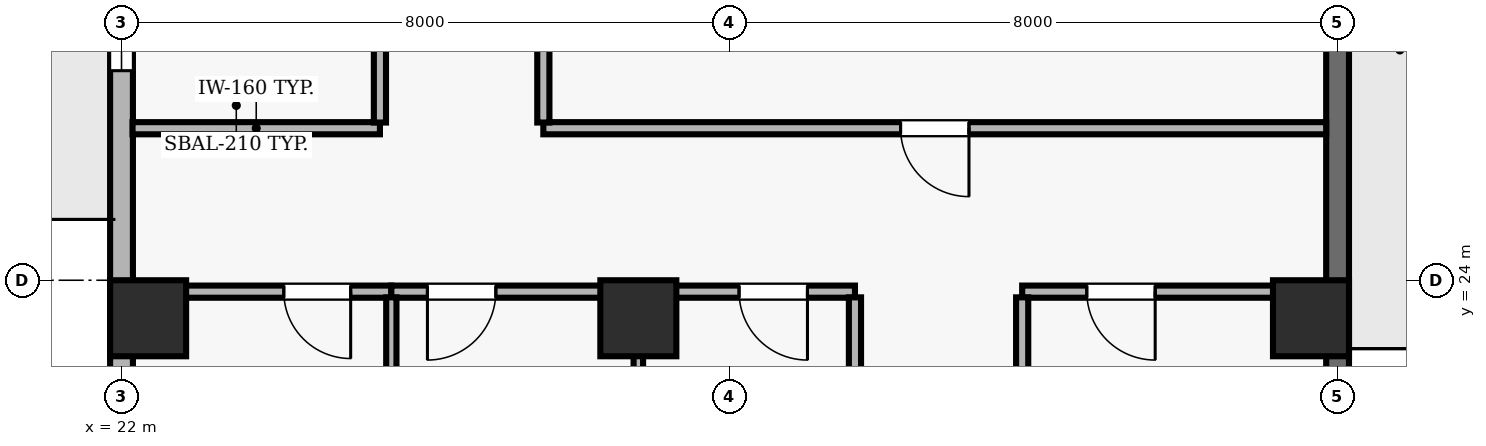
"""IFC4 building model, lengths in metres.
Left out: names, types, materials, properties, quantities, classifications, styles, units other than length and angle.
Written with IfcOpenShell. Run it as: python <this file> out.ifc"""

import sys

from ifc_helpers import new_model, si_unit, direction, frame, frame_2d, origin, origin_2d, place, context, subcontext, project, spatial, rectangle, extrude, element, fill, save


model = new_model("IFC4")
c1 = context("Model", 3, precision=1e-05, world=origin(), true_north=direction((0.0, 1.0)))
c2 = subcontext(c1, "Body", "Model", "MODEL_VIEW")
j1 = project(units=[si_unit("LENGTHUNIT", "METRE"), si_unit("PLANEANGLEUNIT", "RADIAN")], contexts=[c1])
p1 = place(None, origin())
s1 = spatial("IfcSite", under=j1, at=p1, CompositionType="ELEMENT")
p2 = place(p1, origin())
s2 = spatial("IfcBuilding", under=s1, at=p2, CompositionType="ELEMENT")
p3 = place(p2, frame((0.0, 0.0, 226.5)))
s3 = spatial("IfcBuildingStorey", under=s2, at=p3, CompositionType="ELEMENT", Elevation=226.5)
for number, where, z_axis, x_axis in (
    (1, (22.35, 23.5, 0.0), (0.0, 0.0, 1.0), (1.0, 0.0, 0.0)),
    (2, (28.8, 23.5, 0.0), (0.0, 0.0, 1.0), (1.0, 0.0, 0.0)),
    (3, (37.65, 23.5, 0.0), (0.0, 0.0, 1.0), (1.0, 0.0, 0.0)),
):
    element("IfcColumn", number, at=place(p3, frame(where, z_axis=z_axis, x_axis=x_axis)), inside=s3, PredefinedType="COLUMN", context=c2, shape_type="SweptSolid", body=[
        extrude(rectangle(XDim=1.0, YDim=1.0, at=origin_2d()), origin(), (0.0, 0.0, 1.0), 3.9),
    ])
p4 = place(p3, frame((38.0, 22.2, 0.0), z_axis=(0.0, 0.0, 1.0), x_axis=(0.0, 1.0, 0.0)))
e4 = element("IfcWall", 4, at=p4, inside=s3, PredefinedType="SOLIDWALL", context=c2, shape_type="SweptSolid", body=[
    extrude(rectangle(XDim=18.5, YDim=0.3, at=frame_2d((9.25, 0.0))), origin(), (0.0, 0.0, 1.0), 3.69),
])
p5 = place(p4, frame((9.95, 0.0, 0.0)))
e5 = element("IfcOpeningElement", 5, at=p5, cuts=e4, PredefinedType="OPENING", context=c2, shape_type="SweptSolid", body=[
    extrude(rectangle(XDim=1.0, YDim=2.2, at=frame_2d((0.5, 1.1))), frame((0.0, 0.16, 0.0), z_axis=(0.0, -1.0, 0.0), x_axis=(1.0, 0.0, 0.0)), (0.0, 0.0, 1.0), 0.32),
])
p6 = place(p3, frame((22.0, 40.7, 0.0), z_axis=(0.0, 0.0, 1.0), x_axis=(0.0, -1.0, 0.0)))
e6 = element("IfcWall", 6, at=p6, inside=s3, PredefinedType="SOLIDWALL", context=c2, shape_type="SweptSolid", body=[
    extrude(rectangle(XDim=38.2, YDim=0.3, at=frame_2d((19.1, 0.0))), origin(), (0.0, 0.0, 1.0), 3.69),
])
p7 = place(p6, frame((7.8, 0.0, 0.0)))
e7 = element("IfcOpeningElement", 7, at=p7, cuts=e6, PredefinedType="OPENING", context=c2, shape_type="SweptSolid", body=[
    extrude(rectangle(XDim=1.0, YDim=2.2, at=frame_2d((0.5, 1.1))), frame((0.0, 0.16, 0.0), z_axis=(0.0, -1.0, 0.0), x_axis=(1.0, 0.0, 0.0)), (0.0, 0.0, 1.0), 0.32),
])
p8 = place(p6, frame((11.543, 0.0, 0.9)))
e8 = element("IfcOpeningElement", 8, at=p8, cuts=e6, PredefinedType="OPENING", context=c2, shape_type="SweptSolid", body=[
    extrude(rectangle(XDim=2.4, YDim=1.8, at=frame_2d((1.2, 0.9))), frame((0.0, 0.16, 0.0), z_axis=(0.0, -1.0, 0.0), x_axis=(1.0, 0.0, 0.0)), (0.0, 0.0, 1.0), 0.32),
])
p9 = place(p6, frame((18.35, 0.0, 0.9)))
e9 = element("IfcOpeningElement", 9, at=p9, cuts=e6, PredefinedType="OPENING", context=c2, shape_type="SweptSolid", body=[
    extrude(rectangle(XDim=2.4, YDim=1.8, at=frame_2d((1.2, 0.9))), frame((0.0, 0.16, 0.0), z_axis=(0.0, -1.0, 0.0), x_axis=(1.0, 0.0, 0.0)), (0.0, 0.0, 1.0), 0.32),
])
p10 = place(p6, frame((22.907, 0.0, 0.9)))
e10 = element("IfcOpeningElement", 10, at=p10, cuts=e6, PredefinedType="OPENING", context=c2, shape_type="SweptSolid", body=[
    extrude(rectangle(XDim=2.4, YDim=1.8, at=frame_2d((1.2, 0.9))), frame((0.0, 0.16, 0.0), z_axis=(0.0, -1.0, 0.0), x_axis=(1.0, 0.0, 0.0)), (0.0, 0.0, 1.0), 0.32),
])
p11 = place(p6, frame((28.814, 0.0, 0.9)))
e11 = element("IfcOpeningElement", 11, at=p11, cuts=e6, PredefinedType="OPENING", context=c2, shape_type="SweptSolid", body=[
    extrude(rectangle(XDim=2.4, YDim=1.8, at=frame_2d((1.2, 0.9))), frame((0.0, 0.16, 0.0), z_axis=(0.0, -1.0, 0.0), x_axis=(1.0, 0.0, 0.0)), (0.0, 0.0, 1.0), 0.32),
])
p12 = place(p3, frame((25.4, 26.0, 0.0), z_axis=(0.0, 0.0, 1.0), x_axis=(-1.0, 0.0, 0.0)))
e12 = element("IfcWall", 12, at=p12, inside=s3, PredefinedType="PARTITIONING", context=c2, shape_type="SweptSolid", body=[
    extrude(rectangle(XDim=3.255, YDim=0.16, at=frame_2d((1.627, 0.0))), origin(), (0.0, 0.0, 1.0), 3.69),
])
p13 = place(p3, frame((25.55, 23.85, 0.0), z_axis=(0.0, 0.0, 1.0), x_axis=(-1.0, 0.0, 0.0)))
e13 = element("IfcWall", 13, at=p13, inside=s3, PredefinedType="PARTITIONING", context=c2, shape_type="SweptSolid", body=[
    extrude(rectangle(XDim=3.35, YDim=0.16, at=frame_2d((1.675, 0.0))), origin(), (0.0, 0.0, 1.0), 3.146),
])
p14 = place(p13, frame((0.535, 0.0, 0.0)))
e14 = element("IfcOpeningElement", 14, at=p14, cuts=e13, PredefinedType="OPENING", context=c2, shape_type="SweptSolid", body=[
    extrude(rectangle(XDim=0.88, YDim=2.1, at=frame_2d((0.44, 1.05))), frame((0.0, 0.09, 0.0), z_axis=(0.0, -1.0, 0.0), x_axis=(1.0, 0.0, 0.0)), (0.0, 0.0, 1.0), 0.18),
])
p15 = place(p3, frame((28.8, 23.85, 0.0), z_axis=(0.0, 0.0, 1.0), x_axis=(-1.0, 0.0, 0.0)))
e15 = element("IfcWall", 15, at=p15, inside=s3, PredefinedType="PARTITIONING", context=c2, shape_type="SweptSolid", body=[
    extrude(rectangle(XDim=3.25, YDim=0.16, at=frame_2d((1.625, 0.0))), origin(), (0.0, 0.0, 1.0), 3.146),
])
p16 = place(p15, frame((1.875, 0.0, 0.0)))
e16 = element("IfcOpeningElement", 16, at=p16, cuts=e15, PredefinedType="OPENING", context=c2, shape_type="SweptSolid", body=[
    extrude(rectangle(XDim=0.9, YDim=2.1, at=frame_2d((0.45, 1.05))), frame((0.0, 0.09, 0.0), z_axis=(0.0, -1.0, 0.0), x_axis=(1.0, 0.0, 0.0)), (0.0, 0.0, 1.0), 0.18),
])
p17 = place(p3, frame((31.65, 23.85, 0.0), z_axis=(0.0, 0.0, 1.0), x_axis=(-1.0, 0.0, 0.0)))
e17 = element("IfcWall", 17, at=p17, inside=s3, PredefinedType="PARTITIONING", context=c2, shape_type="SweptSolid", body=[
    extrude(rectangle(XDim=2.85, YDim=0.16, at=frame_2d((1.425, 0.0))), origin(), (0.0, 0.0, 1.0), 3.146),
])
p18 = place(p17, frame((0.625, 0.0, 0.0)))
e18 = element("IfcOpeningElement", 18, at=p18, cuts=e17, PredefinedType="OPENING", context=c2, shape_type="SweptSolid", body=[
    extrude(rectangle(XDim=0.9, YDim=2.1, at=frame_2d((0.45, 1.05))), frame((0.0, 0.09, 0.0), z_axis=(0.0, -1.0, 0.0), x_axis=(1.0, 0.0, 0.0)), (0.0, 0.0, 1.0), 0.18),
])
p19 = place(p3, frame((37.85, 23.85, 0.0), z_axis=(0.0, 0.0, 1.0), x_axis=(-1.0, 0.0, 0.0)))
e19 = element("IfcWall", 19, at=p19, inside=s3, PredefinedType="PARTITIONING", context=c2, shape_type="SweptSolid", body=[
    extrude(rectangle(XDim=4.0, YDim=0.16, at=frame_2d((2.0, 0.0))), origin(), (0.0, 0.0, 1.0), 3.146),
])
p20 = place(p19, frame((2.25, 0.0, 0.0)))
e20 = element("IfcOpeningElement", 20, at=p20, cuts=e19, PredefinedType="OPENING", context=c2, shape_type="SweptSolid", body=[
    extrude(rectangle(XDim=0.9, YDim=2.1, at=frame_2d((0.45, 1.05))), frame((0.0, 0.09, 0.0), z_axis=(0.0, -1.0, 0.0), x_axis=(1.0, 0.0, 0.0)), (0.0, 0.0, 1.0), 0.18),
])
p21 = place(p3, frame((37.85, 26.0, 0.0), z_axis=(0.0, 0.0, 1.0), x_axis=(-1.0, 0.0, 0.0)))
e21 = element("IfcWall", 21, at=p21, inside=s3, PredefinedType="PARTITIONING", context=c2, shape_type="SweptSolid", body=[
    extrude(rectangle(XDim=10.3, YDim=0.16, at=frame_2d((5.15, 0.0))), origin(), (0.0, 0.0, 1.0), 3.69),
])
p22 = place(p21, frame((4.7, 0.0, 0.0)))
e22 = element("IfcOpeningElement", 22, at=p22, cuts=e21, PredefinedType="OPENING", context=c2, shape_type="SweptSolid", body=[
    extrude(rectangle(XDim=0.9, YDim=2.1, at=frame_2d((0.45, 1.05))), frame((0.0, 0.09, 0.0), z_axis=(0.0, -1.0, 0.0), x_axis=(1.0, 0.0, 0.0)), (0.0, 0.0, 1.0), 0.18),
])
p23 = place(p3, frame((25.4, 29.915, 0.0), z_axis=(0.0, 0.0, 1.0), x_axis=(0.0, -1.0, 0.0)))
e23 = element("IfcWall", 23, at=p23, inside=s3, PredefinedType="PARTITIONING", context=c2, shape_type="SweptSolid", body=[
    extrude(rectangle(XDim=3.84, YDim=0.16, at=frame_2d((1.92, 0.0))), origin(), (0.0, 0.0, 1.0), 3.69),
])
p24 = place(p23, frame((1.47, 0.0, 0.0)))
e24 = element("IfcOpeningElement", 24, at=p24, cuts=e23, PredefinedType="OPENING", context=c2, shape_type="SweptSolid", body=[
    extrude(rectangle(XDim=0.9, YDim=2.1, at=frame_2d((0.45, 1.05))), frame((0.0, 0.09, 0.0), z_axis=(0.0, -1.0, 0.0), x_axis=(1.0, 0.0, 0.0)), (0.0, 0.0, 1.0), 0.18),
])
p25 = place(p3, frame((25.55, 19.16, 0.0), z_axis=(0.0, 0.0, 1.0), x_axis=(0.0, 1.0, 0.0)))
e25 = element("IfcWall", 25, at=p25, inside=s3, PredefinedType="PARTITIONING", context=c2, shape_type="SweptSolid", body=[
    extrude(rectangle(XDim=4.615, YDim=0.135, at=frame_2d((2.308, 0.0))), origin(), (0.0, 0.0, 1.0), 3.69),
])
p26 = place(p3, frame((27.55, 26.075, 0.0), z_axis=(0.0, 0.0, 1.0), x_axis=(0.0, 1.0, 0.0)))
e26 = element("IfcWall", 26, at=p26, inside=s3, PredefinedType="PARTITIONING", context=c2, shape_type="SweptSolid", body=[
    extrude(rectangle(XDim=3.858, YDim=0.16, at=frame_2d((1.929, 0.0))), origin(), (0.0, 0.0, 1.0), 3.69),
])
p27 = place(p3, frame((28.8, 23.775, 0.0), z_axis=(0.0, 0.0, 1.0), x_axis=(0.0, -1.0, 0.0)))
e27 = element("IfcWall", 27, at=p27, inside=s3, PredefinedType="PARTITIONING", context=c2, shape_type="SweptSolid", body=[
    extrude(rectangle(XDim=2.267, YDim=0.125, at=frame_2d((1.133, 0.0))), origin(), (0.0, 0.0, 1.0), 3.69),
])
p28 = place(p3, frame((31.65, 23.775, 0.0), z_axis=(0.0, 0.0, 1.0), x_axis=(0.0, -1.0, 0.0)))
e28 = element("IfcWall", 28, at=p28, inside=s3, PredefinedType="PARTITIONING", context=c2, shape_type="SweptSolid", body=[
    extrude(rectangle(XDim=2.267, YDim=0.16, at=frame_2d((1.133, 0.0))), origin(), (0.0, 0.0, 1.0), 3.69),
])
p29 = place(p3, frame((33.85, 20.835, 0.0), z_axis=(0.0, 0.0, 1.0), x_axis=(0.0, 1.0, 0.0)))
e29 = element("IfcWall", 29, at=p29, inside=s3, PredefinedType="PARTITIONING", context=c2, shape_type="SweptSolid", body=[
    extrude(rectangle(XDim=2.94, YDim=0.16, at=frame_2d((1.47, 0.0))), origin(), (0.0, 0.0, 1.0), 3.69),
])
p30 = place(p8, origin())
e30 = element("IfcWindow", 30, at=p30, inside=s3, PartitioningType="SINGLE_PANEL", PredefinedType="WINDOW", context=c2, shape_type="SweptSolid", body=[
    extrude(rectangle(XDim=2.4, YDim=1.8, at=frame_2d((1.2, 0.9))), frame((0.0, 0.03, 0.0), z_axis=(0.0, -1.0, 0.0), x_axis=(1.0, 0.0, 0.0)), (0.0, 0.0, 1.0), 0.06),
])
fill(e8, e30)
p31 = place(p20, origin())
e31 = element("IfcDoor", 31, at=p31, inside=s3, OperationType="SINGLE_SWING_LEFT", PredefinedType="DOOR", context=c2, shape_type="SweptSolid", body=[
    extrude(rectangle(XDim=0.9, YDim=2.1, at=frame_2d((0.45, 1.05))), frame((0.0, 0.025, 0.0), z_axis=(0.0, -1.0, 0.0), x_axis=(1.0, 0.0, 0.0)), (0.0, 0.0, 1.0), 0.05),
])
fill(e20, e31)
p32 = place(p18, origin())
e32 = element("IfcDoor", 32, at=p32, inside=s3, OperationType="SINGLE_SWING_LEFT", PredefinedType="DOOR", context=c2, shape_type="SweptSolid", body=[
    extrude(rectangle(XDim=0.9, YDim=2.1, at=frame_2d((0.45, 1.05))), frame((0.0, 0.025, 0.0), z_axis=(0.0, -1.0, 0.0), x_axis=(1.0, 0.0, 0.0)), (0.0, 0.0, 1.0), 0.05),
])
fill(e18, e32)
p33 = place(p14, origin())
e33 = element("IfcDoor", 33, at=p33, inside=s3, OperationType="SINGLE_SWING_LEFT", PredefinedType="DOOR", context=c2, shape_type="SweptSolid", body=[
    extrude(rectangle(XDim=0.88, YDim=2.1, at=frame_2d((0.44, 1.05))), frame((0.0, 0.025, 0.0), z_axis=(0.0, -1.0, 0.0), x_axis=(1.0, 0.0, 0.0)), (0.0, 0.0, 1.0), 0.05),
])
fill(e14, e33)
p34 = place(p16, origin())
e34 = element("IfcDoor", 34, at=p34, inside=s3, OperationType="SINGLE_SWING_RIGHT", PredefinedType="DOOR", context=c2, shape_type="SweptSolid", body=[
    extrude(rectangle(XDim=0.9, YDim=2.1, at=frame_2d((0.45, 1.05))), frame((0.0, 0.025, 0.0), z_axis=(0.0, -1.0, 0.0), x_axis=(1.0, 0.0, 0.0)), (0.0, 0.0, 1.0), 0.05),
])
fill(e16, e34)
p35 = place(p22, origin())
e35 = element("IfcDoor", 35, at=p35, inside=s3, OperationType="SINGLE_SWING_LEFT", PredefinedType="DOOR", context=c2, shape_type="SweptSolid", body=[
    extrude(rectangle(XDim=0.9, YDim=2.1, at=frame_2d((0.45, 1.05))), frame((0.0, 0.025, 0.0), z_axis=(0.0, -1.0, 0.0), x_axis=(1.0, 0.0, 0.0)), (0.0, 0.0, 1.0), 0.05),
])
fill(e22, e35)
save(model, sys.argv[1])
